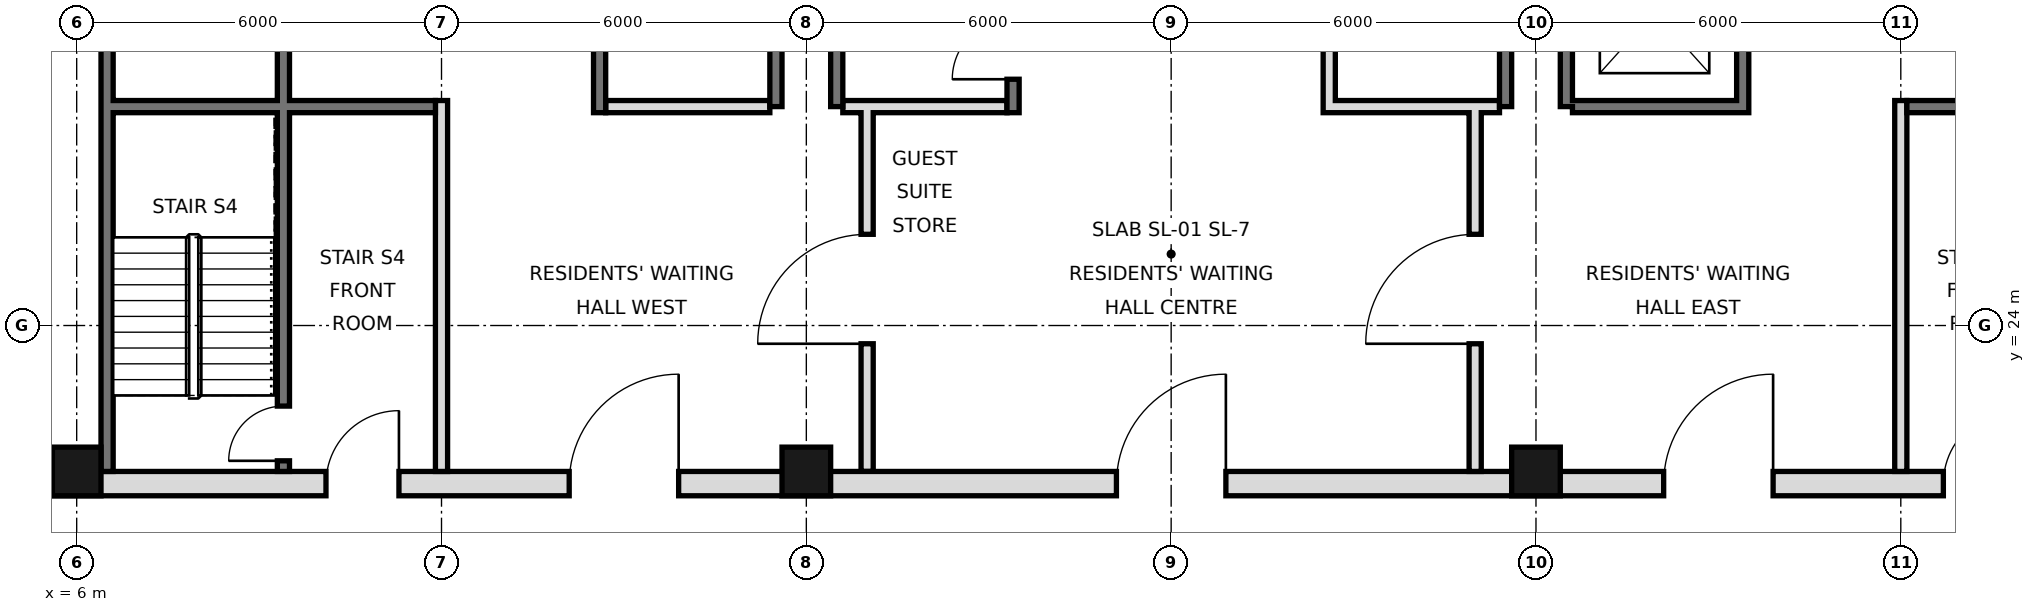
"""IFC4 building model, lengths in metres.
Left out: names, types, materials, properties, quantities, classifications, styles, units other than length and angle.
Written with IfcOpenShell. Run it as: python <this file> out.ifc"""

import sys

from ifc_helpers import new_model, si_unit, direction, frame, frame_2d, origin, origin_2d, place, context, subcontext, project, spatial, rectangle, hollow_rectangle, extrude, element, fill, save


model = new_model("IFC4")
c1 = context("Model", 3, precision=1e-05, world=origin(), true_north=direction((0.0, 1.0)))
c2 = subcontext(c1, "Body", "Model", "MODEL_VIEW")
j1 = project(units=[si_unit("LENGTHUNIT", "METRE"), si_unit("PLANEANGLEUNIT", "RADIAN")], contexts=[c1])
p1 = place(None, origin())
s1 = spatial("IfcSite", under=j1, at=p1, CompositionType="ELEMENT")
p2 = place(p1, origin())
s2 = spatial("IfcBuilding", under=s1, at=p2, CompositionType="ELEMENT")
p3 = place(p2, frame((0.0, 0.0, 266.6)))
s3 = spatial("IfcBuildingStorey", under=s2, at=p3, CompositionType="ELEMENT", Elevation=266.6)
for number, where, z_axis, x_axis in (
    (1, (6.0, 21.6, 0.0), (0.0, 0.0, 1.0), (1.0, 0.0, 0.0)),
    (2, (18.0, 21.6, 0.0), (0.0, 0.0, 1.0), (1.0, 0.0, 0.0)),
    (3, (30.0, 21.6, 0.0), (0.0, 0.0, 1.0), (1.0, 0.0, 0.0)),
):
    element("IfcColumn", number, at=place(p3, frame(where, z_axis=z_axis, x_axis=x_axis)), inside=s3, PredefinedType="COLUMN", context=c2, shape_type="SweptSolid", body=[
        extrude(hollow_rectangle(XDim=0.8, YDim=0.8, WallThickness=0.032, at=origin_2d()), origin(), (0.0, 0.0, 1.0), 3.6),
    ])
p4 = place(p3, frame((6.5, 21.6, 0.0), z_axis=(0.0, 0.0, 1.0), x_axis=(0.0, 1.0, 0.0)))
e4 = element("IfcWall", 4, at=p4, inside=s3, PredefinedType="SOLIDWALL", context=c2, shape_type="SweptSolid", body=[
    extrude(rectangle(XDim=23.5, YDim=0.2, at=frame_2d((11.75, 0.0))), origin(), (0.0, 0.0, 1.0), 3.42),
])
for number, where, z_axis, x_axis in (
    (5, (17.5, 27.6, 0.0), (0.0, 0.0, 1.0), (0.0, 1.0, 0.0)),
    (6, (18.5, 27.6, 0.0), (0.0, 0.0, 1.0), (0.0, 1.0, 0.0)),
    (7, (29.5, 27.6, 0.0), (0.0, 0.0, 1.0), (0.0, 1.0, 0.0)),
    (8, (30.5, 27.6, 0.0), (0.0, 0.0, 1.0), (0.0, 1.0, 0.0)),
):
    element("IfcWall", number, at=place(p3, frame(where, z_axis=z_axis, x_axis=x_axis)), inside=s3, PredefinedType="SOLIDWALL", context=c2, shape_type="SweptSolid", body=[
        extrude(rectangle(XDim=17.5, YDim=0.2, at=frame_2d((8.75, 0.0))), origin(), (0.0, 0.0, 1.0), 3.42),
    ])
p5 = place(p3, frame((5.6, 21.4, 0.0), z_axis=(0.0, 0.0, 1.0), x_axis=(1.0, 0.0, 0.0)))
e9 = element("IfcWall", 9, at=p5, inside=s3, PredefinedType="SOLIDWALL", context=c2, shape_type="SweptSolid", body=[
    extrude(rectangle(XDim=36.8, YDim=0.4, at=frame_2d((18.4, 0.0))), origin(), (0.0, 0.0, 1.0), 3.42),
])
p6 = place(p5, frame((8.5, 0.0, 0.0)))
e10 = element("IfcOpeningElement", 10, at=p6, cuts=e9, PredefinedType="OPENING", context=c2, shape_type="SweptSolid", body=[
    extrude(rectangle(XDim=1.8, YDim=2.1, at=frame_2d((0.9, 1.05))), frame((0.0, 0.21, 0.0), z_axis=(0.0, -1.0, 0.0), x_axis=(1.0, 0.0, 0.0)), (0.0, 0.0, 1.0), 0.42),
])
p7 = place(p5, frame((17.5, 0.0, 0.0)))
e11 = element("IfcOpeningElement", 11, at=p7, cuts=e9, PredefinedType="OPENING", context=c2, shape_type="SweptSolid", body=[
    extrude(rectangle(XDim=1.8, YDim=2.1, at=frame_2d((0.9, 1.05))), frame((0.0, 0.21, 0.0), z_axis=(0.0, -1.0, 0.0), x_axis=(1.0, 0.0, 0.0)), (0.0, 0.0, 1.0), 0.42),
])
p8 = place(p5, frame((26.5, 0.0, 0.0)))
e12 = element("IfcOpeningElement", 12, at=p8, cuts=e9, PredefinedType="OPENING", context=c2, shape_type="SweptSolid", body=[
    extrude(rectangle(XDim=1.8, YDim=2.1, at=frame_2d((0.9, 1.05))), frame((0.0, 0.21, 0.0), z_axis=(0.0, -1.0, 0.0), x_axis=(1.0, 0.0, 0.0)), (0.0, 0.0, 1.0), 0.42),
])
p9 = place(p5, frame((4.5, 0.0, 0.0)))
e13 = element("IfcOpeningElement", 13, at=p9, cuts=e9, PredefinedType="OPENING", context=c2, shape_type="SweptSolid", body=[
    extrude(rectangle(XDim=1.2, YDim=2.1, at=frame_2d((0.6, 1.05))), frame((0.0, 0.21, 0.0), z_axis=(0.0, -1.0, 0.0), x_axis=(1.0, 0.0, 0.0)), (0.0, 0.0, 1.0), 0.42),
])
p10 = place(p5, frame((31.1, 0.0, 0.0)))
e14 = element("IfcOpeningElement", 14, at=p10, cuts=e9, PredefinedType="OPENING", context=c2, shape_type="SweptSolid", body=[
    extrude(rectangle(XDim=1.2, YDim=2.1, at=frame_2d((0.6, 1.05))), frame((0.0, 0.21, 0.0), z_axis=(0.0, -1.0, 0.0), x_axis=(1.0, 0.0, 0.0)), (0.0, 0.0, 1.0), 0.42),
])
p11 = place(p3, frame((19.0, 21.6, 0.0), z_axis=(0.0, 0.0, 1.0), x_axis=(0.0, 1.0, 0.0)))
e15 = element("IfcWall", 15, at=p11, inside=s3, PredefinedType="PARTITIONING", context=c2, shape_type="SweptSolid", body=[
    extrude(rectangle(XDim=6.0, YDim=0.2, at=frame_2d((3.0, 0.0))), origin(), (0.0, 0.0, 1.0), 3.42),
])
p12 = place(p11, frame((2.1, 0.0, 0.0)))
e16 = element("IfcOpeningElement", 16, at=p12, cuts=e15, PredefinedType="OPENING", context=c2, shape_type="SweptSolid", body=[
    extrude(rectangle(XDim=1.8, YDim=2.1, at=frame_2d((0.9, 1.05))), frame((0.0, 0.11, 0.0), z_axis=(0.0, -1.0, 0.0), x_axis=(1.0, 0.0, 0.0)), (0.0, 0.0, 1.0), 0.22),
])
p13 = place(p3, frame((29.0, 21.6, 0.0), z_axis=(0.0, 0.0, 1.0), x_axis=(0.0, 1.0, 0.0)))
e17 = element("IfcWall", 17, at=p13, inside=s3, PredefinedType="PARTITIONING", context=c2, shape_type="SweptSolid", body=[
    extrude(rectangle(XDim=6.0, YDim=0.2, at=frame_2d((3.0, 0.0))), origin(), (0.0, 0.0, 1.0), 3.42),
])
p14 = place(p13, frame((2.1, 0.0, 0.0)))
e18 = element("IfcOpeningElement", 18, at=p14, cuts=e17, PredefinedType="OPENING", context=c2, shape_type="SweptSolid", body=[
    extrude(rectangle(XDim=1.8, YDim=2.1, at=frame_2d((0.9, 1.05))), frame((0.0, 0.11, 0.0), z_axis=(0.0, -1.0, 0.0), x_axis=(1.0, 0.0, 0.0)), (0.0, 0.0, 1.0), 0.22),
])
p15 = place(p3, frame((12.0, 21.6, 0.0), z_axis=(0.0, 0.0, 1.0), x_axis=(0.0, 1.0, 0.0)))
e19 = element("IfcWall", 19, at=p15, inside=s3, PredefinedType="PARTITIONING", context=c2, shape_type="SweptSolid", body=[
    extrude(rectangle(XDim=6.1, YDim=0.2, at=frame_2d((3.05, 0.0))), origin(), (0.0, 0.0, 1.0), 3.42),
])
p16 = place(p3, frame((14.6, 27.5, 0.0), z_axis=(0.0, 0.0, 1.0), x_axis=(0.0, 1.0, 0.0)))
e20 = element("IfcWall", 20, at=p16, inside=s3, PredefinedType="SOLIDWALL", context=c2, shape_type="SweptSolid", body=[
    extrude(rectangle(XDim=17.5, YDim=0.2, at=frame_2d((8.75, 0.0))), origin(), (0.0, 0.0, 1.0), 3.42),
])
p17 = place(p16, frame((15.4, 0.0, 0.0)))
e21 = element("IfcOpeningElement", 21, at=p17, cuts=e20, PredefinedType="OPENING", context=c2, shape_type="SweptSolid", body=[
    extrude(rectangle(XDim=1.1, YDim=2.1, at=frame_2d((0.55, 1.05))), frame((0.0, 0.11, 0.0), z_axis=(0.0, -1.0, 0.0), x_axis=(1.0, 0.0, 0.0)), (0.0, 0.0, 1.0), 0.22),
])
p18 = place(p16, frame((2.7, 0.0, 0.0)))
e22 = element("IfcOpeningElement", 22, at=p18, cuts=e20, PredefinedType="OPENING", context=c2, shape_type="SweptSolid", body=[
    extrude(rectangle(XDim=1.0, YDim=2.1, at=frame_2d((0.5, 1.05))), frame((0.0, 0.11, 0.0), z_axis=(0.0, -1.0, 0.0), x_axis=(1.0, 0.0, 0.0)), (0.0, 0.0, 1.0), 0.22),
])
p19 = place(p16, frame((9.9, 0.0, 0.0)))
e23 = element("IfcOpeningElement", 23, at=p19, cuts=e20, PredefinedType="OPENING", context=c2, shape_type="SweptSolid", body=[
    extrude(rectangle(XDim=0.9, YDim=2.1, at=frame_2d((0.45, 1.05))), frame((0.0, 0.11, 0.0), z_axis=(0.0, -1.0, 0.0), x_axis=(1.0, 0.0, 0.0)), (0.0, 0.0, 1.0), 0.22),
])
p20 = place(p3, frame((21.4, 27.5, 0.0), z_axis=(0.0, 0.0, 1.0), x_axis=(0.0, 1.0, 0.0)))
e24 = element("IfcWall", 24, at=p20, inside=s3, PredefinedType="SOLIDWALL", context=c2, shape_type="SweptSolid", body=[
    extrude(rectangle(XDim=17.5, YDim=0.2, at=frame_2d((8.75, 0.0))), origin(), (0.0, 0.0, 1.0), 3.42),
])
p21 = place(p20, frame((0.55, 0.0, 0.0)))
e25 = element("IfcOpeningElement", 25, at=p21, cuts=e24, PredefinedType="OPENING", context=c2, shape_type="SweptSolid", body=[
    extrude(rectangle(XDim=1.0, YDim=2.1, at=frame_2d((0.5, 1.05))), frame((0.0, 0.11, 0.0), z_axis=(0.0, -1.0, 0.0), x_axis=(1.0, 0.0, 0.0)), (0.0, 0.0, 1.0), 0.22),
])
p22 = place(p20, frame((3.65, 0.0, 0.0)))
e26 = element("IfcOpeningElement", 26, at=p22, cuts=e24, PredefinedType="OPENING", context=c2, shape_type="SweptSolid", body=[
    extrude(rectangle(XDim=1.0, YDim=2.1, at=frame_2d((0.5, 1.05))), frame((0.0, 0.11, 0.0), z_axis=(0.0, -1.0, 0.0), x_axis=(1.0, 0.0, 0.0)), (0.0, 0.0, 1.0), 0.22),
])
p23 = place(p20, frame((9.8, 0.0, 0.0)))
e27 = element("IfcOpeningElement", 27, at=p23, cuts=e24, PredefinedType="OPENING", context=c2, shape_type="SweptSolid", body=[
    extrude(rectangle(XDim=1.0, YDim=2.1, at=frame_2d((0.5, 1.05))), frame((0.0, 0.11, 0.0), z_axis=(0.0, -1.0, 0.0), x_axis=(1.0, 0.0, 0.0)), (0.0, 0.0, 1.0), 0.22),
])
p24 = place(p20, frame((7.4, 0.0, 0.0)))
e28 = element("IfcOpeningElement", 28, at=p24, cuts=e24, PredefinedType="OPENING", context=c2, shape_type="SweptSolid", body=[
    extrude(rectangle(XDim=0.9, YDim=2.1, at=frame_2d((0.45, 1.05))), frame((0.0, 0.11, 0.0), z_axis=(0.0, -1.0, 0.0), x_axis=(1.0, 0.0, 0.0)), (0.0, 0.0, 1.0), 0.22),
])
p25 = place(p3, frame((26.6, 27.5, 0.0), z_axis=(0.0, 0.0, 1.0), x_axis=(0.0, 1.0, 0.0)))
e29 = element("IfcWall", 29, at=p25, inside=s3, PredefinedType="SOLIDWALL", context=c2, shape_type="SweptSolid", body=[
    extrude(rectangle(XDim=17.5, YDim=0.2, at=frame_2d((8.75, 0.0))), origin(), (0.0, 0.0, 1.0), 3.42),
])
p26 = place(p25, frame((4.3, 0.0, 0.0)))
e30 = element("IfcOpeningElement", 30, at=p26, cuts=e29, PredefinedType="OPENING", context=c2, shape_type="SweptSolid", body=[
    extrude(rectangle(XDim=0.9, YDim=2.1, at=frame_2d((0.45, 1.05))), frame((0.0, 0.11, 0.0), z_axis=(0.0, -1.0, 0.0), x_axis=(1.0, 0.0, 0.0)), (0.0, 0.0, 1.0), 0.22),
])
p27 = place(p25, frame((10.35, 0.0, 0.0)))
e31 = element("IfcOpeningElement", 31, at=p27, cuts=e29, PredefinedType="OPENING", context=c2, shape_type="SweptSolid", body=[
    extrude(rectangle(XDim=1.0, YDim=2.1, at=frame_2d((0.5, 1.05))), frame((0.0, 0.11, 0.0), z_axis=(0.0, -1.0, 0.0), x_axis=(1.0, 0.0, 0.0)), (0.0, 0.0, 1.0), 0.22),
])
p28 = place(p25, frame((15.475, 0.0, 0.0)))
e32 = element("IfcOpeningElement", 32, at=p28, cuts=e29, PredefinedType="OPENING", context=c2, shape_type="SweptSolid", body=[
    extrude(rectangle(XDim=1.0, YDim=2.1, at=frame_2d((0.5, 1.05))), frame((0.0, 0.11, 0.0), z_axis=(0.0, -1.0, 0.0), x_axis=(1.0, 0.0, 0.0)), (0.0, 0.0, 1.0), 0.22),
])
p29 = place(p3, frame((33.4, 27.5, 0.0), z_axis=(0.0, 0.0, 1.0), x_axis=(0.0, 1.0, 0.0)))
e33 = element("IfcWall", 33, at=p29, inside=s3, PredefinedType="SOLIDWALL", context=c2, shape_type="SweptSolid", body=[
    extrude(rectangle(XDim=17.5, YDim=0.2, at=frame_2d((8.75, 0.0))), origin(), (0.0, 0.0, 1.0), 3.42),
])
p30 = place(p29, frame((1.1, 0.0, 0.0)))
e34 = element("IfcOpeningElement", 34, at=p30, cuts=e33, PredefinedType="OPENING", context=c2, shape_type="SweptSolid", body=[
    extrude(rectangle(XDim=1.1, YDim=2.1, at=frame_2d((0.55, 1.05))), frame((0.0, 0.11, 0.0), z_axis=(0.0, -1.0, 0.0), x_axis=(1.0, 0.0, 0.0)), (0.0, 0.0, 1.0), 0.22),
])
p31 = place(p29, frame((4.2, 0.0, 0.0)))
e35 = element("IfcOpeningElement", 35, at=p31, cuts=e33, PredefinedType="OPENING", context=c2, shape_type="SweptSolid", body=[
    extrude(rectangle(XDim=1.1, YDim=2.1, at=frame_2d((0.55, 1.05))), frame((0.0, 0.11, 0.0), z_axis=(0.0, -1.0, 0.0), x_axis=(1.0, 0.0, 0.0)), (0.0, 0.0, 1.0), 0.22),
])
p32 = place(p29, frame((15.4, 0.0, 0.0)))
e36 = element("IfcOpeningElement", 36, at=p32, cuts=e33, PredefinedType="OPENING", context=c2, shape_type="SweptSolid", body=[
    extrude(rectangle(XDim=1.1, YDim=2.1, at=frame_2d((0.55, 1.05))), frame((0.0, 0.11, 0.0), z_axis=(0.0, -1.0, 0.0), x_axis=(1.0, 0.0, 0.0)), (0.0, 0.0, 1.0), 0.22),
])
p33 = place(p29, frame((9.9, 0.0, 0.0)))
e37 = element("IfcOpeningElement", 37, at=p33, cuts=e33, PredefinedType="OPENING", context=c2, shape_type="SweptSolid", body=[
    extrude(rectangle(XDim=0.9, YDim=2.1, at=frame_2d((0.45, 1.05))), frame((0.0, 0.11, 0.0), z_axis=(0.0, -1.0, 0.0), x_axis=(1.0, 0.0, 0.0)), (0.0, 0.0, 1.0), 0.22),
])
p34 = place(p3, frame((36.0, 21.6, 0.0), z_axis=(0.0, 0.0, 1.0), x_axis=(0.0, 1.0, 0.0)))
e38 = element("IfcWall", 38, at=p34, inside=s3, PredefinedType="PARTITIONING", context=c2, shape_type="SweptSolid", body=[
    extrude(rectangle(XDim=6.1, YDim=0.2, at=frame_2d((3.05, 0.0))), origin(), (0.0, 0.0, 1.0), 3.42),
])
p35 = place(p3, frame((9.4, 21.6, 0.0), z_axis=(0.0, 0.0, 1.0), x_axis=(0.0, 1.0, 0.0)))
e39 = element("IfcWall", 39, at=p35, inside=s3, PredefinedType="SOLIDWALL", context=c2, shape_type="SweptSolid", body=[
    extrude(rectangle(XDim=23.4, YDim=0.2, at=frame_2d((11.7, 0.0))), origin(), (0.0, 0.0, 1.0), 3.42),
])
p36 = place(p35, frame((7.8, 0.0, 0.0)))
e40 = element("IfcOpeningElement", 40, at=p36, cuts=e39, PredefinedType="OPENING", context=c2, shape_type="SweptSolid", body=[
    extrude(rectangle(XDim=1.0, YDim=2.1, at=frame_2d((0.5, 1.05))), frame((0.0, 0.11, 0.0), z_axis=(0.0, -1.0, 0.0), x_axis=(1.0, 0.0, 0.0)), (0.0, 0.0, 1.0), 0.22),
])
p37 = place(p35, frame((12.45, 0.0, 0.0)))
e41 = element("IfcOpeningElement", 41, at=p37, cuts=e39, PredefinedType="OPENING", context=c2, shape_type="SweptSolid", body=[
    extrude(rectangle(XDim=1.0, YDim=2.1, at=frame_2d((0.5, 1.05))), frame((0.0, 0.11, 0.0), z_axis=(0.0, -1.0, 0.0), x_axis=(1.0, 0.0, 0.0)), (0.0, 0.0, 1.0), 0.22),
])
p38 = place(p35, frame((15.7, 0.0, 0.0)))
e42 = element("IfcOpeningElement", 42, at=p38, cuts=e39, PredefinedType="OPENING", context=c2, shape_type="SweptSolid", body=[
    extrude(rectangle(XDim=1.0, YDim=2.1, at=frame_2d((0.5, 1.05))), frame((0.0, 0.11, 0.0), z_axis=(0.0, -1.0, 0.0), x_axis=(1.0, 0.0, 0.0)), (0.0, 0.0, 1.0), 0.22),
])
p39 = place(p35, frame((0.175, 0.0, 0.0)))
e43 = element("IfcOpeningElement", 43, at=p39, cuts=e39, PredefinedType="OPENING", context=c2, shape_type="SweptSolid", body=[
    extrude(rectangle(XDim=0.9, YDim=2.1, at=frame_2d((0.45, 1.05))), frame((0.0, 0.11, 0.0), z_axis=(0.0, -1.0, 0.0), x_axis=(1.0, 0.0, 0.0)), (0.0, 0.0, 1.0), 0.22),
])
for number, where, z_axis, x_axis in (
    (44, (14.7, 27.6, 0.0), (0.0, 0.0, 1.0), (1.0, 0.0, 0.0)),
    (45, (18.6, 27.6, 0.0), (0.0, 0.0, 1.0), (1.0, 0.0, 0.0)),
):
    element("IfcWall", number, at=place(p3, frame(where, z_axis=z_axis, x_axis=x_axis)), inside=s3, PredefinedType="PARTITIONING", context=c2, shape_type="SweptSolid", body=[
        extrude(rectangle(XDim=2.7, YDim=0.2, at=frame_2d((1.35, 0.0))), origin(), (0.0, 0.0, 1.0), 3.42),
    ])
for number, where, z_axis, x_axis in (
    (46, (26.7, 27.6, 0.0), (0.0, 0.0, 1.0), (1.0, 0.0, 0.0)),
    (47, (30.6, 27.6, 0.0), (0.0, 0.0, 1.0), (1.0, 0.0, 0.0)),
):
    element("IfcWall", number, at=place(p3, frame(where, z_axis=z_axis, x_axis=x_axis)), inside=s3, PredefinedType="SOLIDWALL", context=c2, shape_type="SweptSolid", body=[
        extrude(rectangle(XDim=2.7, YDim=0.2, at=frame_2d((1.35, 0.0))), origin(), (0.0, 0.0, 1.0), 3.42),
    ])
for number, where, z_axis, x_axis in (
    (48, (36.1, 27.6, 0.0), (0.0, 0.0, 1.0), (1.0, 0.0, 0.0)),
    (49, (6.6, 27.6, 0.0), (0.0, 0.0, 1.0), (1.0, 0.0, 0.0)),
):
    element("IfcWall", number, at=place(p3, frame(where, z_axis=z_axis, x_axis=x_axis)), inside=s3, PredefinedType="SOLIDWALL", context=c2, shape_type="SweptSolid", body=[
        extrude(rectangle(XDim=5.3, YDim=0.2, at=frame_2d((2.65, 0.0))), origin(), (0.0, 0.0, 1.0), 3.42),
    ])
p40 = place(p6, frame((1.8, 0.0, 0.0), z_axis=(0.0, 0.0, 1.0), x_axis=(-1.0, 0.0, 0.0)))
e50 = element("IfcDoor", 50, at=p40, inside=s3, OperationType="SINGLE_SWING_LEFT", PredefinedType="DOOR", context=c2, shape_type="SweptSolid", body=[
    extrude(rectangle(XDim=1.8, YDim=2.1, at=frame_2d((0.9, 1.05))), frame((0.0, 0.025, 0.0), z_axis=(0.0, -1.0, 0.0), x_axis=(1.0, 0.0, 0.0)), (0.0, 0.0, 1.0), 0.05),
])
fill(e10, e50)
p41 = place(p12, origin())
e51 = element("IfcDoor", 51, at=p41, inside=s3, OperationType="SINGLE_SWING_LEFT", PredefinedType="DOOR", context=c2, shape_type="SweptSolid", body=[
    extrude(rectangle(XDim=1.8, YDim=2.1, at=frame_2d((0.9, 1.05))), frame((0.0, 0.025, 0.0), z_axis=(0.0, -1.0, 0.0), x_axis=(1.0, 0.0, 0.0)), (0.0, 0.0, 1.0), 0.05),
])
fill(e16, e51)
p42 = place(p7, frame((1.8, 0.0, 0.0), z_axis=(0.0, 0.0, 1.0), x_axis=(-1.0, 0.0, 0.0)))
e52 = element("IfcDoor", 52, at=p42, inside=s3, OperationType="SINGLE_SWING_LEFT", PredefinedType="DOOR", context=c2, shape_type="SweptSolid", body=[
    extrude(rectangle(XDim=1.8, YDim=2.1, at=frame_2d((0.9, 1.05))), frame((0.0, 0.025, 0.0), z_axis=(0.0, -1.0, 0.0), x_axis=(1.0, 0.0, 0.0)), (0.0, 0.0, 1.0), 0.05),
])
fill(e11, e52)
p43 = place(p14, origin())
e53 = element("IfcDoor", 53, at=p43, inside=s3, OperationType="SINGLE_SWING_LEFT", PredefinedType="DOOR", context=c2, shape_type="SweptSolid", body=[
    extrude(rectangle(XDim=1.8, YDim=2.1, at=frame_2d((0.9, 1.05))), frame((0.0, 0.025, 0.0), z_axis=(0.0, -1.0, 0.0), x_axis=(1.0, 0.0, 0.0)), (0.0, 0.0, 1.0), 0.05),
])
fill(e18, e53)
p44 = place(p8, frame((1.8, 0.0, 0.0), z_axis=(0.0, 0.0, 1.0), x_axis=(-1.0, 0.0, 0.0)))
e54 = element("IfcDoor", 54, at=p44, inside=s3, OperationType="SINGLE_SWING_LEFT", PredefinedType="DOOR", context=c2, shape_type="SweptSolid", body=[
    extrude(rectangle(XDim=1.8, YDim=2.1, at=frame_2d((0.9, 1.05))), frame((0.0, 0.025, 0.0), z_axis=(0.0, -1.0, 0.0), x_axis=(1.0, 0.0, 0.0)), (0.0, 0.0, 1.0), 0.05),
])
fill(e12, e54)
p45 = place(p9, frame((1.2, 0.0, 0.0), z_axis=(0.0, 0.0, 1.0), x_axis=(-1.0, 0.0, 0.0)))
e55 = element("IfcDoor", 55, at=p45, inside=s3, OperationType="SINGLE_SWING_LEFT", PredefinedType="DOOR", context=c2, shape_type="SweptSolid", body=[
    extrude(rectangle(XDim=1.2, YDim=2.1, at=frame_2d((0.6, 1.05))), frame((0.0, 0.025, 0.0), z_axis=(0.0, -1.0, 0.0), x_axis=(1.0, 0.0, 0.0)), (0.0, 0.0, 1.0), 0.05),
])
fill(e13, e55)
p46 = place(p10, frame((1.2, 0.0, 0.0), z_axis=(0.0, 0.0, 1.0), x_axis=(-1.0, 0.0, 0.0)))
e56 = element("IfcDoor", 56, at=p46, inside=s3, OperationType="SINGLE_SWING_LEFT", PredefinedType="DOOR", context=c2, shape_type="SweptSolid", body=[
    extrude(rectangle(XDim=1.2, YDim=2.1, at=frame_2d((0.6, 1.05))), frame((0.0, 0.025, 0.0), z_axis=(0.0, -1.0, 0.0), x_axis=(1.0, 0.0, 0.0)), (0.0, 0.0, 1.0), 0.05),
])
fill(e14, e56)
p47 = place(p21, origin())
e57 = element("IfcDoor", 57, at=p47, inside=s3, OperationType="SINGLE_SWING_LEFT", PredefinedType="DOOR", context=c2, shape_type="SweptSolid", body=[
    extrude(rectangle(XDim=1.0, YDim=2.1, at=frame_2d((0.5, 1.05))), frame((0.0, 0.025, 0.0), z_axis=(0.0, -1.0, 0.0), x_axis=(1.0, 0.0, 0.0)), (0.0, 0.0, 1.0), 0.05),
])
fill(e25, e57)
p48 = place(p39, origin())
e58 = element("IfcDoor", 58, at=p48, inside=s3, OperationType="SINGLE_SWING_LEFT", PredefinedType="DOOR", context=c2, shape_type="SweptSolid", body=[
    extrude(rectangle(XDim=0.9, YDim=2.1, at=frame_2d((0.45, 1.05))), frame((0.0, 0.025, 0.0), z_axis=(0.0, -1.0, 0.0), x_axis=(1.0, 0.0, 0.0)), (0.0, 0.0, 1.0), 0.05),
])
fill(e43, e58)
save(model, sys.argv[1])
